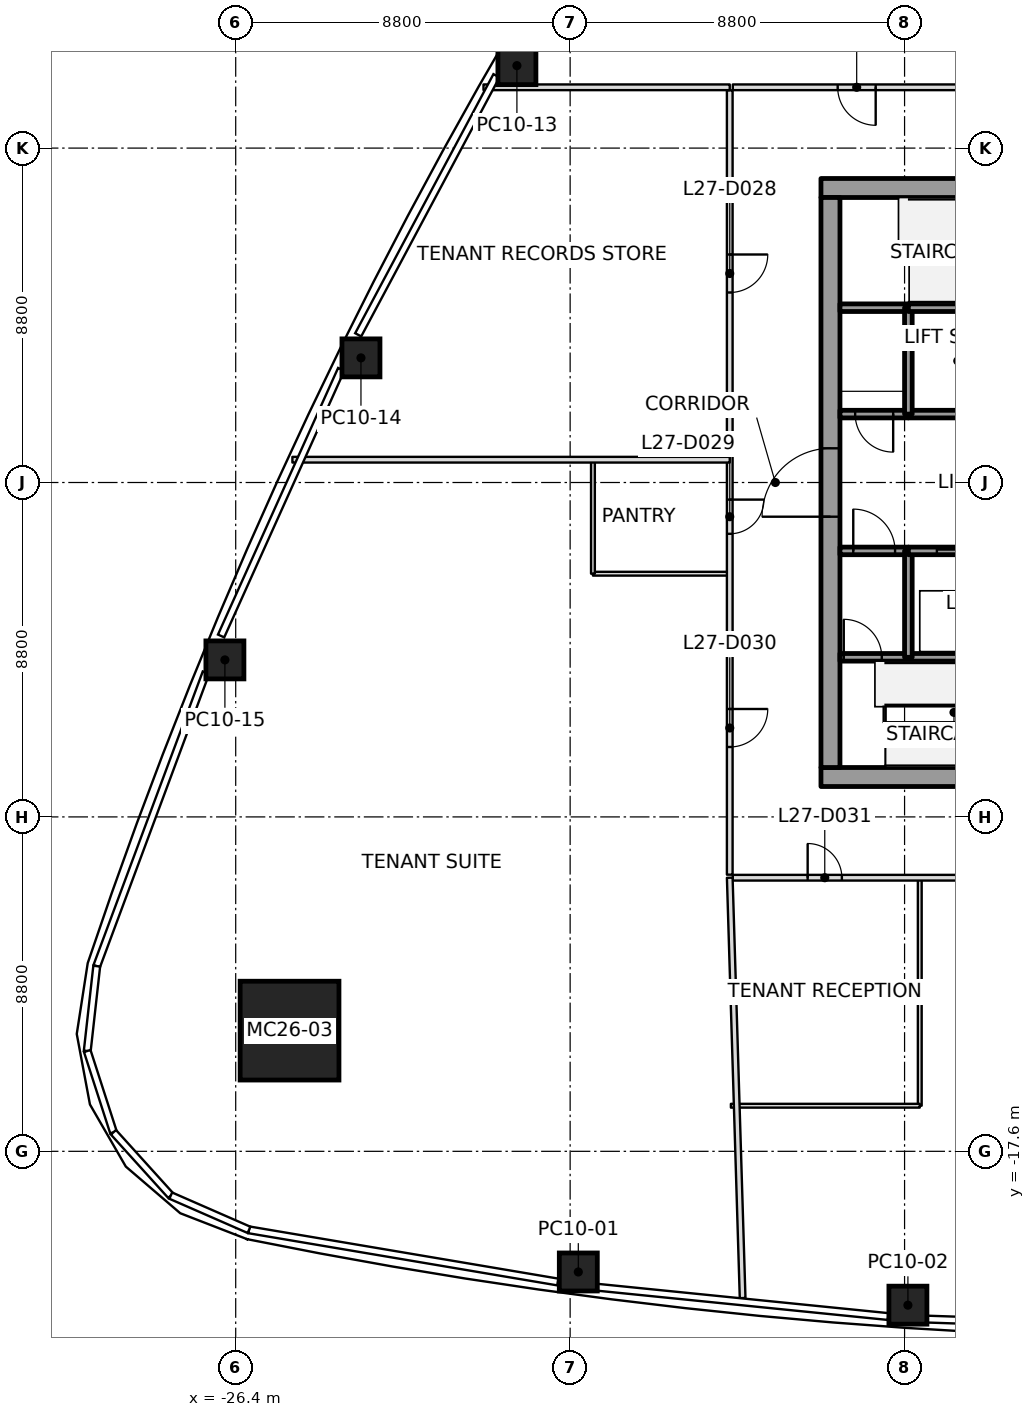
"""IFC4 building model, lengths in metres.
Left out: names, types, materials, properties, quantities, classifications, styles, units other than length and angle.
Written with IfcOpenShell. Run it as: python <this file> out.ifc"""

import sys

from ifc_helpers import new_model, si_unit, direction, frame, frame_2d, origin, origin_2d, place, context, subcontext, project, spatial, rectangle, extrude, element, fill, save


model = new_model("IFC4")
c1 = context("Model", 3, precision=1e-05, world=origin(), true_north=direction((0.0, 1.0)))
c2 = subcontext(c1, "Body", "Model", "MODEL_VIEW")
j1 = project(units=[si_unit("LENGTHUNIT", "METRE"), si_unit("PLANEANGLEUNIT", "RADIAN")], contexts=[c1])
p1 = place(None, origin())
s1 = spatial("IfcSite", under=j1, at=p1, CompositionType="ELEMENT")
p2 = place(p1, origin())
s2 = spatial("IfcBuilding", under=s1, at=p2, CompositionType="ELEMENT")
p3 = place(p2, frame((0.0, 0.0, 129.8)))
s3 = spatial("IfcBuildingStorey", under=s2, at=p3, CompositionType="ELEMENT", Elevation=129.8)
p4 = place(p3, frame((-24.983, -14.424, 0.0), z_axis=(0.028122372328, 0.016226791842, 0.999472772716), x_axis=(0.999604487872, -0.00045651644, -0.02811866672)))
e1 = element("IfcColumn", 1, at=p4, inside=s3, PredefinedType="COLUMN", context=c2, shape_type="SweptSolid", body=[
    extrude(rectangle(XDim=2.6, YDim=2.6, at=origin_2d()), origin(), (0.0, 0.0, 1.0), 4.002),
])
p5 = place(p3, frame((-17.385, -20.775, 0.0), z_axis=(0.017696459735, 0.010434809016, 0.999788952766), x_axis=(-0.990903847039, 0.133599816886, 0.016144808774)))
e2 = element("IfcColumn", 2, at=p5, inside=s3, PredefinedType="COLUMN", context=c2, shape_type="SweptSolid", body=[
    extrude(rectangle(XDim=1.0, YDim=1.0, at=origin_2d()), origin(), (0.0, 0.0, 1.0), 4.001),
])
p6 = place(p3, frame((-8.712, -21.648, 0.0), z_axis=(0.008849199152, 0.01116829962, 0.999898475225), x_axis=(-0.997723247671, 0.066955214695, 0.008082096352)))
e3 = element("IfcColumn", 3, at=p6, inside=s3, PredefinedType="COLUMN", context=c2, shape_type="SweptSolid", body=[
    extrude(rectangle(XDim=1.0, YDim=1.0, at=origin_2d()), origin(), (0.0, 0.0, 1.0), 4.0),
])
p7 = place(p3, frame((-19.0, 10.97, 0.0), z_axis=(0.009887049298, -0.00573692984, 0.999934664812), x_axis=(0.499975560967, 0.866039512843, 2.5126546e-05)))
e4 = element("IfcColumn", 4, at=p7, inside=s3, PredefinedType="COLUMN", context=c2, shape_type="SweptSolid", body=[
    extrude(rectangle(XDim=1.0, YDim=1.0, at=origin_2d()), origin(), (0.0, 0.0, 1.0), 4.0),
])
p8 = place(p3, frame((-23.104, 3.279, 0.0), z_axis=(0.014097687793, 0.002136013302, 0.999898341156), x_axis=(0.440934207428, 0.897502569263, -0.008134057119)))
e5 = element("IfcColumn", 5, at=p8, inside=s3, PredefinedType="COLUMN", context=c2, shape_type="SweptSolid", body=[
    extrude(rectangle(XDim=1.0, YDim=1.0, at=origin_2d()), origin(), (0.0, 0.0, 1.0), 4.0),
])
p9 = place(p3, frame((-26.684, -4.668, 0.0), z_axis=(0.017879535448, 0.010068680372, 0.999789449778), x_axis=(0.379920166438, 0.92487901014, -0.016108498867)))
e6 = element("IfcColumn", 6, at=p9, inside=s3, PredefinedType="COLUMN", context=c2, shape_type="SweptSolid", body=[
    extrude(rectangle(XDim=1.0, YDim=1.0, at=origin_2d()), origin(), (0.0, 0.0, 1.0), 4.001),
])
p10 = place(p3, frame((-11.0, -7.75, 0.0), z_axis=(0.0, 0.0, 1.0), x_axis=(1.0, 0.0, 0.0)))
e7 = element("IfcWall", 7, at=p10, inside=s3, PredefinedType="SHEAR", context=c2, shape_type="SweptSolid", body=[
    extrude(rectangle(XDim=22.0, YDim=0.5, at=frame_2d((11.0, 0.0))), origin(), (0.0, 0.0, 1.0), 4.0),
])
p11 = place(p10, frame((10.45, 0.0, 0.0)))
e8 = element("IfcOpeningElement", 8, at=p11, cuts=e7, PredefinedType="OPENING", context=c2, shape_type="SweptSolid", body=[
    extrude(rectangle(XDim=1.1, YDim=2.1, at=frame_2d((0.55, 1.05))), frame((0.0, 0.25, 0.0), z_axis=(0.0, -1.0, 0.0), x_axis=(1.0, 0.0, 0.0)), (0.0, 0.0, 1.0), 0.5),
])
p12 = place(p3, frame((-11.0, 7.75, 0.0), z_axis=(0.0, 0.0, 1.0), x_axis=(1.0, 0.0, 0.0)))
e9 = element("IfcWall", 9, at=p12, inside=s3, PredefinedType="SHEAR", context=c2, shape_type="SweptSolid", body=[
    extrude(rectangle(XDim=22.0, YDim=0.5, at=frame_2d((11.0, 0.0))), origin(), (0.0, 0.0, 1.0), 4.0),
])
p13 = place(p12, frame((10.45, 0.0, 0.0)))
e10 = element("IfcOpeningElement", 10, at=p13, cuts=e9, PredefinedType="OPENING", context=c2, shape_type="SweptSolid", body=[
    extrude(rectangle(XDim=1.1, YDim=2.1, at=frame_2d((0.55, 1.05))), frame((0.0, 0.25, 0.0), z_axis=(0.0, -1.0, 0.0), x_axis=(1.0, 0.0, 0.0)), (0.0, 0.0, 1.0), 0.5),
])
p14 = place(p3, frame((-10.75, -7.5, 0.0), z_axis=(0.0, 0.0, 1.0), x_axis=(0.0, 1.0, 0.0)))
e11 = element("IfcWall", 11, at=p14, inside=s3, PredefinedType="SHEAR", context=c2, shape_type="SweptSolid", body=[
    extrude(rectangle(XDim=15.0, YDim=0.5, at=frame_2d((7.5, 0.0))), origin(), (0.0, 0.0, 1.0), 4.0),
])
p15 = place(p14, frame((6.6, 0.0, 0.0)))
e12 = element("IfcOpeningElement", 12, at=p15, cuts=e11, PredefinedType="OPENING", context=c2, shape_type="SweptSolid", body=[
    extrude(rectangle(XDim=1.8, YDim=2.1, at=frame_2d((0.9, 1.05))), frame((0.0, 0.25, 0.0), z_axis=(0.0, -1.0, 0.0), x_axis=(1.0, 0.0, 0.0)), (0.0, 0.0, 1.0), 0.5),
])
p16 = place(p3, frame((-10.5, -4.6, 0.0), z_axis=(0.0, 0.0, 1.0), x_axis=(1.0, 0.0, 0.0)))
e13 = element("IfcWall", 13, at=p16, inside=s3, PredefinedType="SOLIDWALL", context=c2, shape_type="SweptSolid", body=[
    extrude(rectangle(XDim=1.8, YDim=0.2, at=frame_2d((0.9, 0.0))), origin(), (0.0, 0.0, 1.0), 3.85),
])
p17 = place(p16, frame((0.1, 0.0, 0.0)))
e14 = element("IfcOpeningElement", 14, at=p17, cuts=e13, PredefinedType="OPENING", context=c2, shape_type="SweptSolid", body=[
    extrude(rectangle(XDim=1.0, YDim=2.1, at=frame_2d((0.5, 1.05))), frame((0.0, 0.1, 0.0), z_axis=(0.0, -1.0, 0.0), x_axis=(1.0, 0.0, 0.0)), (0.0, 0.0, 1.0), 0.2),
])
p18 = place(p3, frame((-10.5, -1.8, 0.0), z_axis=(0.0, 0.0, 1.0), x_axis=(1.0, 0.0, 0.0)))
e15 = element("IfcWall", 15, at=p18, inside=s3, PredefinedType="SOLIDWALL", context=c2, shape_type="SweptSolid", body=[
    extrude(rectangle(XDim=1.8, YDim=0.2, at=frame_2d((0.9, 0.0))), origin(), (0.0, 0.0, 1.0), 3.85),
])
p19 = place(p18, frame((0.35, 0.0, 0.0)))
e16 = element("IfcOpeningElement", 16, at=p19, cuts=e15, PredefinedType="OPENING", context=c2, shape_type="SweptSolid", body=[
    extrude(rectangle(XDim=1.1, YDim=2.1, at=frame_2d((0.55, 1.05))), frame((0.0, 0.1, 0.0), z_axis=(0.0, -1.0, 0.0), x_axis=(1.0, 0.0, 0.0)), (0.0, 0.0, 1.0), 0.2),
])
p20 = place(p3, frame((-8.7, 1.8, 0.0), z_axis=(0.0, 0.0, 1.0), x_axis=(-1.0, 0.0, 0.0)))
e17 = element("IfcWall", 17, at=p20, inside=s3, PredefinedType="SOLIDWALL", context=c2, shape_type="SweptSolid", body=[
    extrude(rectangle(XDim=1.8, YDim=0.2, at=frame_2d((0.9, 0.0))), origin(), (0.0, 0.0, 1.0), 3.85),
])
p21 = place(p20, frame((0.4, 0.0, 0.0)))
e18 = element("IfcOpeningElement", 18, at=p21, cuts=e17, PredefinedType="OPENING", context=c2, shape_type="SweptSolid", body=[
    extrude(rectangle(XDim=1.0, YDim=2.1, at=frame_2d((0.5, 1.05))), frame((0.0, 0.1, 0.0), z_axis=(0.0, -1.0, 0.0), x_axis=(1.0, 0.0, 0.0)), (0.0, 0.0, 1.0), 0.2),
])
p22 = place(p3, frame((-8.7, 4.6, 0.0), z_axis=(0.0, 0.0, 1.0), x_axis=(-1.0, 0.0, 0.0)))
e19 = element("IfcWall", 19, at=p22, inside=s3, PredefinedType="SOLIDWALL", context=c2, shape_type="SweptSolid", body=[
    extrude(rectangle(XDim=1.8, YDim=0.2, at=frame_2d((0.9, 0.0))), origin(), (0.0, 0.0, 1.0), 3.85),
])
p23 = place(p3, frame((-8.7, -4.6, 0.0), z_axis=(0.0, 0.0, 1.0), x_axis=(1.0, 0.0, 0.0)))
e20 = element("IfcWall", 20, at=p23, inside=s3, PredefinedType="SOLIDWALL", context=c2, shape_type="SweptSolid", body=[
    extrude(rectangle(XDim=2.6, YDim=0.2, at=frame_2d((1.3, 0.0))), origin(), (0.0, 0.0, 1.0), 3.85),
])
p24 = place(p3, frame((-8.7, -4.6, 0.0), z_axis=(0.0, 0.0, 1.0), x_axis=(0.0, 1.0, 0.0)))
e21 = element("IfcWall", 21, at=p24, inside=s3, PredefinedType="SOLIDWALL", context=c2, shape_type="SweptSolid", body=[
    extrude(rectangle(XDim=2.8, YDim=0.2, at=frame_2d((1.4, 0.0))), origin(), (0.0, 0.0, 1.0), 3.85),
])
p25 = place(p3, frame((-8.7, -1.8, 0.0), z_axis=(0.0, 0.0, 1.0), x_axis=(1.0, 0.0, 0.0)))
e22 = element("IfcWall", 22, at=p25, inside=s3, PredefinedType="SOLIDWALL", context=c2, shape_type="SweptSolid", body=[
    extrude(rectangle(XDim=2.6, YDim=0.2, at=frame_2d((1.3, 0.0))), origin(), (0.0, 0.0, 1.0), 3.85),
])
p26 = place(p25, frame((0.75, 0.0, 0.0)))
e23 = element("IfcOpeningElement", 23, at=p26, cuts=e22, PredefinedType="OPENING", context=c2, shape_type="SweptSolid", body=[
    extrude(rectangle(XDim=1.1, YDim=2.1, at=frame_2d((0.55, 1.05))), frame((0.0, 0.1, 0.0), z_axis=(0.0, -1.0, 0.0), x_axis=(1.0, 0.0, 0.0)), (0.0, 0.0, 1.0), 0.2),
])
p27 = place(p3, frame((-6.1, 1.8, 0.0), z_axis=(0.0, 0.0, 1.0), x_axis=(-1.0, 0.0, 0.0)))
e24 = element("IfcWall", 24, at=p27, inside=s3, PredefinedType="SOLIDWALL", context=c2, shape_type="SweptSolid", body=[
    extrude(rectangle(XDim=2.6, YDim=0.2, at=frame_2d((1.3, 0.0))), origin(), (0.0, 0.0, 1.0), 3.85),
])
p28 = place(p3, frame((-8.7, 1.8, 0.0), z_axis=(0.0, 0.0, 1.0), x_axis=(0.0, 1.0, 0.0)))
e25 = element("IfcWall", 25, at=p28, inside=s3, PredefinedType="SOLIDWALL", context=c2, shape_type="SweptSolid", body=[
    extrude(rectangle(XDim=2.8, YDim=0.2, at=frame_2d((1.4, 0.0))), origin(), (0.0, 0.0, 1.0), 3.85),
])
p29 = place(p3, frame((-6.1, 4.6, 0.0), z_axis=(0.0, 0.0, 1.0), x_axis=(-1.0, 0.0, 0.0)))
e26 = element("IfcWall", 26, at=p29, inside=s3, PredefinedType="SOLIDWALL", context=c2, shape_type="SweptSolid", body=[
    extrude(rectangle(XDim=2.6, YDim=0.2, at=frame_2d((1.3, 0.0))), origin(), (0.0, 0.0, 1.0), 3.85),
])
p30 = place(p3, frame((-13.4, 0.6, 0.0), z_axis=(0.0, 0.0, 1.0), x_axis=(-1.0, 0.0, 0.0)))
e27 = element("IfcWall", 27, at=p30, inside=s3, PredefinedType="PARTITIONING", context=c2, shape_type="SweptSolid", body=[
    extrude(rectangle(XDim=11.508, YDim=0.15, at=frame_2d((5.754, 0.0))), origin(), (0.0, 0.0, 1.0), 3.234),
])
p31 = place(p3, frame((-13.4, 10.4, 0.0), z_axis=(0.0, 0.0, 1.0), x_axis=(-1.0, 0.0, 0.0)))
e28 = element("IfcWall", 28, at=p31, inside=s3, PredefinedType="PARTITIONING", context=c2, shape_type="SweptSolid", body=[
    extrude(rectangle(XDim=6.48, YDim=0.15, at=frame_2d((3.24, 0.0))), origin(), (0.0, 0.0, 1.0), 3.234),
])
p32 = place(p3, frame((-13.4, -10.4, 0.0), z_axis=(0.0, 0.0, 1.0), x_axis=(0.030597011899, -0.999531801827, 0.0)))
e29 = element("IfcWall", 29, at=p32, inside=s3, PredefinedType="PARTITIONING", context=c2, shape_type="SweptSolid", body=[
    extrude(rectangle(XDim=11.067, YDim=0.15, at=frame_2d((5.534, 0.0))), origin(), (0.0, 0.0, 1.0), 3.234),
])
p33 = place(p3, frame((-13.4, 10.32, 0.0), z_axis=(0.0, 0.0, 1.0), x_axis=(0.0, -1.0, 0.0)))
e30 = element("IfcWall", 30, at=p33, inside=s3, PredefinedType="PARTITIONING", context=c2, shape_type="SweptSolid", body=[
    extrude(rectangle(XDim=20.64, YDim=0.15, at=frame_2d((10.32, 0.0))), origin(), (0.0, 0.0, 1.0), 3.166),
])
p34 = place(p33, frame((4.32, 0.0, 0.0)))
e31 = element("IfcOpeningElement", 31, at=p34, cuts=e30, PredefinedType="OPENING", context=c2, shape_type="SweptSolid", body=[
    extrude(rectangle(XDim=1.0, YDim=2.1, at=frame_2d((0.5, 1.05))), frame((0.0, 0.075, 0.0), z_axis=(0.0, -1.0, 0.0), x_axis=(1.0, 0.0, 0.0)), (0.0, 0.0, 1.0), 0.15),
])
p35 = place(p33, frame((10.77, 0.0, 0.0)))
e32 = element("IfcOpeningElement", 32, at=p35, cuts=e30, PredefinedType="OPENING", context=c2, shape_type="SweptSolid", body=[
    extrude(rectangle(XDim=0.9, YDim=2.1, at=frame_2d((0.45, 1.05))), frame((0.0, 0.075, 0.0), z_axis=(0.0, -1.0, 0.0), x_axis=(1.0, 0.0, 0.0)), (0.0, 0.0, 1.0), 0.15),
])
p36 = place(p33, frame((16.28, 0.0, 0.0)))
e33 = element("IfcOpeningElement", 33, at=p36, cuts=e30, PredefinedType="OPENING", context=c2, shape_type="SweptSolid", body=[
    extrude(rectangle(XDim=1.0, YDim=2.1, at=frame_2d((0.5, 1.05))), frame((0.0, 0.075, 0.0), z_axis=(0.0, -1.0, 0.0), x_axis=(1.0, 0.0, 0.0)), (0.0, 0.0, 1.0), 0.15),
])
p37 = place(p3, frame((-13.32, -10.4, 0.0), z_axis=(0.0, 0.0, 1.0), x_axis=(1.0, 0.0, 0.0)))
e34 = element("IfcWall", 34, at=p37, inside=s3, PredefinedType="PARTITIONING", context=c2, shape_type="SweptSolid", body=[
    extrude(rectangle(XDim=26.64, YDim=0.15, at=frame_2d((13.32, 0.0))), origin(), (0.0, 0.0, 1.0), 3.317),
])
p38 = place(p37, frame((1.97, 0.0, 0.0)))
e35 = element("IfcOpeningElement", 35, at=p38, cuts=e34, PredefinedType="OPENING", context=c2, shape_type="SweptSolid", body=[
    extrude(rectangle(XDim=0.9, YDim=2.1, at=frame_2d((0.45, 1.05))), frame((0.0, 0.075, 0.0), z_axis=(0.0, -1.0, 0.0), x_axis=(1.0, 0.0, 0.0)), (0.0, 0.0, 1.0), 0.15),
])
p39 = place(p37, frame((9.87, 0.0, 0.0)))
e36 = element("IfcOpeningElement", 36, at=p39, cuts=e34, PredefinedType="OPENING", context=c2, shape_type="SweptSolid", body=[
    extrude(rectangle(XDim=1.0, YDim=2.1, at=frame_2d((0.5, 1.05))), frame((0.0, 0.075, 0.0), z_axis=(0.0, -1.0, 0.0), x_axis=(1.0, 0.0, 0.0)), (0.0, 0.0, 1.0), 0.15),
])
p40 = place(p37, frame((20.72, 0.0, 0.0)))
e37 = element("IfcOpeningElement", 37, at=p40, cuts=e34, PredefinedType="OPENING", context=c2, shape_type="SweptSolid", body=[
    extrude(rectangle(XDim=1.0, YDim=2.1, at=frame_2d((0.5, 1.05))), frame((0.0, 0.075, 0.0), z_axis=(0.0, -1.0, 0.0), x_axis=(1.0, 0.0, 0.0)), (0.0, 0.0, 1.0), 0.15),
])
p41 = place(p3, frame((13.32, 10.4, 0.0), z_axis=(0.0, 0.0, 1.0), x_axis=(-1.0, 0.0, 0.0)))
e38 = element("IfcWall", 38, at=p41, inside=s3, PredefinedType="PARTITIONING", context=c2, shape_type="SweptSolid", body=[
    extrude(rectangle(XDim=26.64, YDim=0.15, at=frame_2d((13.32, 0.0))), origin(), (0.0, 0.0, 1.0), 3.166),
])
p42 = place(p41, frame((0.95, 0.0, 0.0)))
e39 = element("IfcOpeningElement", 39, at=p42, cuts=e38, PredefinedType="OPENING", context=c2, shape_type="SweptSolid", body=[
    extrude(rectangle(XDim=0.9, YDim=2.1, at=frame_2d((0.45, 1.05))), frame((0.0, 0.075, 0.0), z_axis=(0.0, -1.0, 0.0), x_axis=(1.0, 0.0, 0.0)), (0.0, 0.0, 1.0), 0.15),
])
p43 = place(p41, frame((8.86, 0.0, 0.0)))
e40 = element("IfcOpeningElement", 40, at=p43, cuts=e38, PredefinedType="OPENING", context=c2, shape_type="SweptSolid", body=[
    extrude(rectangle(XDim=1.0, YDim=2.1, at=frame_2d((0.5, 1.05))), frame((0.0, 0.075, 0.0), z_axis=(0.0, -1.0, 0.0), x_axis=(1.0, 0.0, 0.0)), (0.0, 0.0, 1.0), 0.15),
])
p44 = place(p41, frame((17.37, 0.0, 0.0)))
e41 = element("IfcOpeningElement", 41, at=p44, cuts=e38, PredefinedType="OPENING", context=c2, shape_type="SweptSolid", body=[
    extrude(rectangle(XDim=0.9, YDim=2.1, at=frame_2d((0.45, 1.05))), frame((0.0, 0.075, 0.0), z_axis=(0.0, -1.0, 0.0), x_axis=(1.0, 0.0, 0.0)), (0.0, 0.0, 1.0), 0.15),
])
p45 = place(p41, frame((22.88, 0.0, 0.0)))
e42 = element("IfcOpeningElement", 42, at=p45, cuts=e38, PredefinedType="OPENING", context=c2, shape_type="SweptSolid", body=[
    extrude(rectangle(XDim=1.0, YDim=2.1, at=frame_2d((0.5, 1.05))), frame((0.0, 0.075, 0.0), z_axis=(0.0, -1.0, 0.0), x_axis=(1.0, 0.0, 0.0)), (0.0, 0.0, 1.0), 0.15),
])
p46 = place(p3, frame((-13.43, -2.4, 0.0), z_axis=(0.0, 0.0, 1.0), x_axis=(-1.0, 0.0, 0.0)))
e43 = element("IfcWall", 43, at=p46, inside=s3, PredefinedType="PARTITIONING", context=c2, shape_type="SweptSolid", body=[
    extrude(rectangle(XDim=3.57, YDim=0.1, at=frame_2d((1.785, 0.0))), origin(), (0.0, 0.0, 1.0), 3.45),
])
p47 = place(p3, frame((-17.0, -2.4, 0.0), z_axis=(0.0, 0.0, 1.0), x_axis=(0.0, 1.0, 0.0)))
e44 = element("IfcWall", 44, at=p47, inside=s3, PredefinedType="PARTITIONING", context=c2, shape_type="SweptSolid", body=[
    extrude(rectangle(XDim=2.97, YDim=0.1, at=frame_2d((1.485, 0.0))), origin(), (0.0, 0.0, 1.0), 3.45),
])
p48 = place(p3, frame((-8.4, -10.43, 0.0), z_axis=(0.0, 0.0, 1.0), x_axis=(0.0, -1.0, 0.0)))
e45 = element("IfcWall", 45, at=p48, inside=s3, PredefinedType="PARTITIONING", context=c2, shape_type="SweptSolid", body=[
    extrude(rectangle(XDim=5.97, YDim=0.1, at=frame_2d((2.985, 0.0))), origin(), (0.0, 0.0, 1.0), 3.45),
])
p49 = place(p3, frame((-8.4, -16.4, 0.0), z_axis=(0.0, 0.0, 1.0), x_axis=(-1.0, 0.0, 0.0)))
e46 = element("IfcWall", 46, at=p49, inside=s3, PredefinedType="PARTITIONING", context=c2, shape_type="SweptSolid", body=[
    extrude(rectangle(XDim=4.97, YDim=0.1, at=frame_2d((2.485, 0.0))), origin(), (0.0, 0.0, 1.0), 3.317),
])
p50 = place(p45, origin())
e47 = element("IfcDoor", 47, at=p50, inside=s3, OperationType="SINGLE_SWING_RIGHT", PredefinedType="DOOR", context=c2, shape_type="SweptSolid", body=[
    extrude(rectangle(XDim=1.0, YDim=2.1, at=frame_2d((0.5, 1.05))), frame((0.0, 0.025, 0.0), z_axis=(0.0, -1.0, 0.0), x_axis=(1.0, 0.0, 0.0)), (0.0, 0.0, 1.0), 0.05),
])
fill(e42, e47)
p51 = place(p34, origin())
e48 = element("IfcDoor", 48, at=p51, inside=s3, OperationType="SINGLE_SWING_RIGHT", PredefinedType="DOOR", context=c2, shape_type="SweptSolid", body=[
    extrude(rectangle(XDim=1.0, YDim=2.1, at=frame_2d((0.5, 1.05))), frame((0.0, 0.025, 0.0), z_axis=(0.0, -1.0, 0.0), x_axis=(1.0, 0.0, 0.0)), (0.0, 0.0, 1.0), 0.05),
])
fill(e31, e48)
p52 = place(p35, origin())
e49 = element("IfcDoor", 49, at=p52, inside=s3, OperationType="SINGLE_SWING_LEFT", PredefinedType="DOOR", context=c2, shape_type="SweptSolid", body=[
    extrude(rectangle(XDim=0.9, YDim=2.1, at=frame_2d((0.45, 1.05))), frame((0.0, 0.025, 0.0), z_axis=(0.0, -1.0, 0.0), x_axis=(1.0, 0.0, 0.0)), (0.0, 0.0, 1.0), 0.05),
])
fill(e32, e49)
p53 = place(p36, origin())
e50 = element("IfcDoor", 50, at=p53, inside=s3, OperationType="SINGLE_SWING_RIGHT", PredefinedType="DOOR", context=c2, shape_type="SweptSolid", body=[
    extrude(rectangle(XDim=1.0, YDim=2.1, at=frame_2d((0.5, 1.05))), frame((0.0, 0.025, 0.0), z_axis=(0.0, -1.0, 0.0), x_axis=(1.0, 0.0, 0.0)), (0.0, 0.0, 1.0), 0.05),
])
fill(e33, e50)
p54 = place(p38, origin())
e51 = element("IfcDoor", 51, at=p54, inside=s3, OperationType="SINGLE_SWING_LEFT", PredefinedType="DOOR", context=c2, shape_type="SweptSolid", body=[
    extrude(rectangle(XDim=0.9, YDim=2.1, at=frame_2d((0.45, 1.05))), frame((0.0, 0.025, 0.0), z_axis=(0.0, -1.0, 0.0), x_axis=(1.0, 0.0, 0.0)), (0.0, 0.0, 1.0), 0.05),
])
fill(e35, e51)
p55 = place(p26, origin())
e52 = element("IfcDoor", 52, at=p55, inside=s3, OperationType="SLIDING_TO_RIGHT", PredefinedType="DOOR", context=c2, shape_type="SweptSolid", body=[
    extrude(rectangle(XDim=1.1, YDim=2.1, at=frame_2d((0.55, 1.05))), frame((0.0, 0.025, 0.0), z_axis=(0.0, -1.0, 0.0), x_axis=(1.0, 0.0, 0.0)), (0.0, 0.0, 1.0), 0.05),
])
fill(e23, e52)
p56 = place(p19, origin())
e53 = element("IfcDoor", 53, at=p56, inside=s3, OperationType="SINGLE_SWING_LEFT", PredefinedType="DOOR", context=c2, shape_type="SweptSolid", body=[
    extrude(rectangle(XDim=1.1, YDim=2.1, at=frame_2d((0.55, 1.05))), frame((0.0, 0.025, 0.0), z_axis=(0.0, -1.0, 0.0), x_axis=(1.0, 0.0, 0.0)), (0.0, 0.0, 1.0), 0.05),
])
fill(e16, e53)
p57 = place(p21, origin())
e54 = element("IfcDoor", 54, at=p57, inside=s3, OperationType="SINGLE_SWING_RIGHT", PredefinedType="DOOR", context=c2, shape_type="SweptSolid", body=[
    extrude(rectangle(XDim=1.0, YDim=2.1, at=frame_2d((0.5, 1.05))), frame((0.0, 0.025, 0.0), z_axis=(0.0, -1.0, 0.0), x_axis=(1.0, 0.0, 0.0)), (0.0, 0.0, 1.0), 0.05),
])
fill(e18, e54)
p58 = place(p17, origin())
e55 = element("IfcDoor", 55, at=p58, inside=s3, OperationType="SINGLE_SWING_LEFT", PredefinedType="DOOR", context=c2, shape_type="SweptSolid", body=[
    extrude(rectangle(XDim=1.0, YDim=2.1, at=frame_2d((0.5, 1.05))), frame((0.0, 0.025, 0.0), z_axis=(0.0, -1.0, 0.0), x_axis=(1.0, 0.0, 0.0)), (0.0, 0.0, 1.0), 0.05),
])
fill(e14, e55)
p59 = place(p15, origin())
e56 = element("IfcDoor", 56, at=p59, inside=s3, OperationType="DOUBLE_DOOR_SINGLE_SWING", PredefinedType="DOOR", context=c2, shape_type="SweptSolid", body=[
    extrude(rectangle(XDim=1.8, YDim=2.1, at=frame_2d((0.9, 1.05))), frame((0.0, 0.025, 0.0), z_axis=(0.0, -1.0, 0.0), x_axis=(1.0, 0.0, 0.0)), (0.0, 0.0, 1.0), 0.05),
])
fill(e12, e56)
save(model, sys.argv[1])
